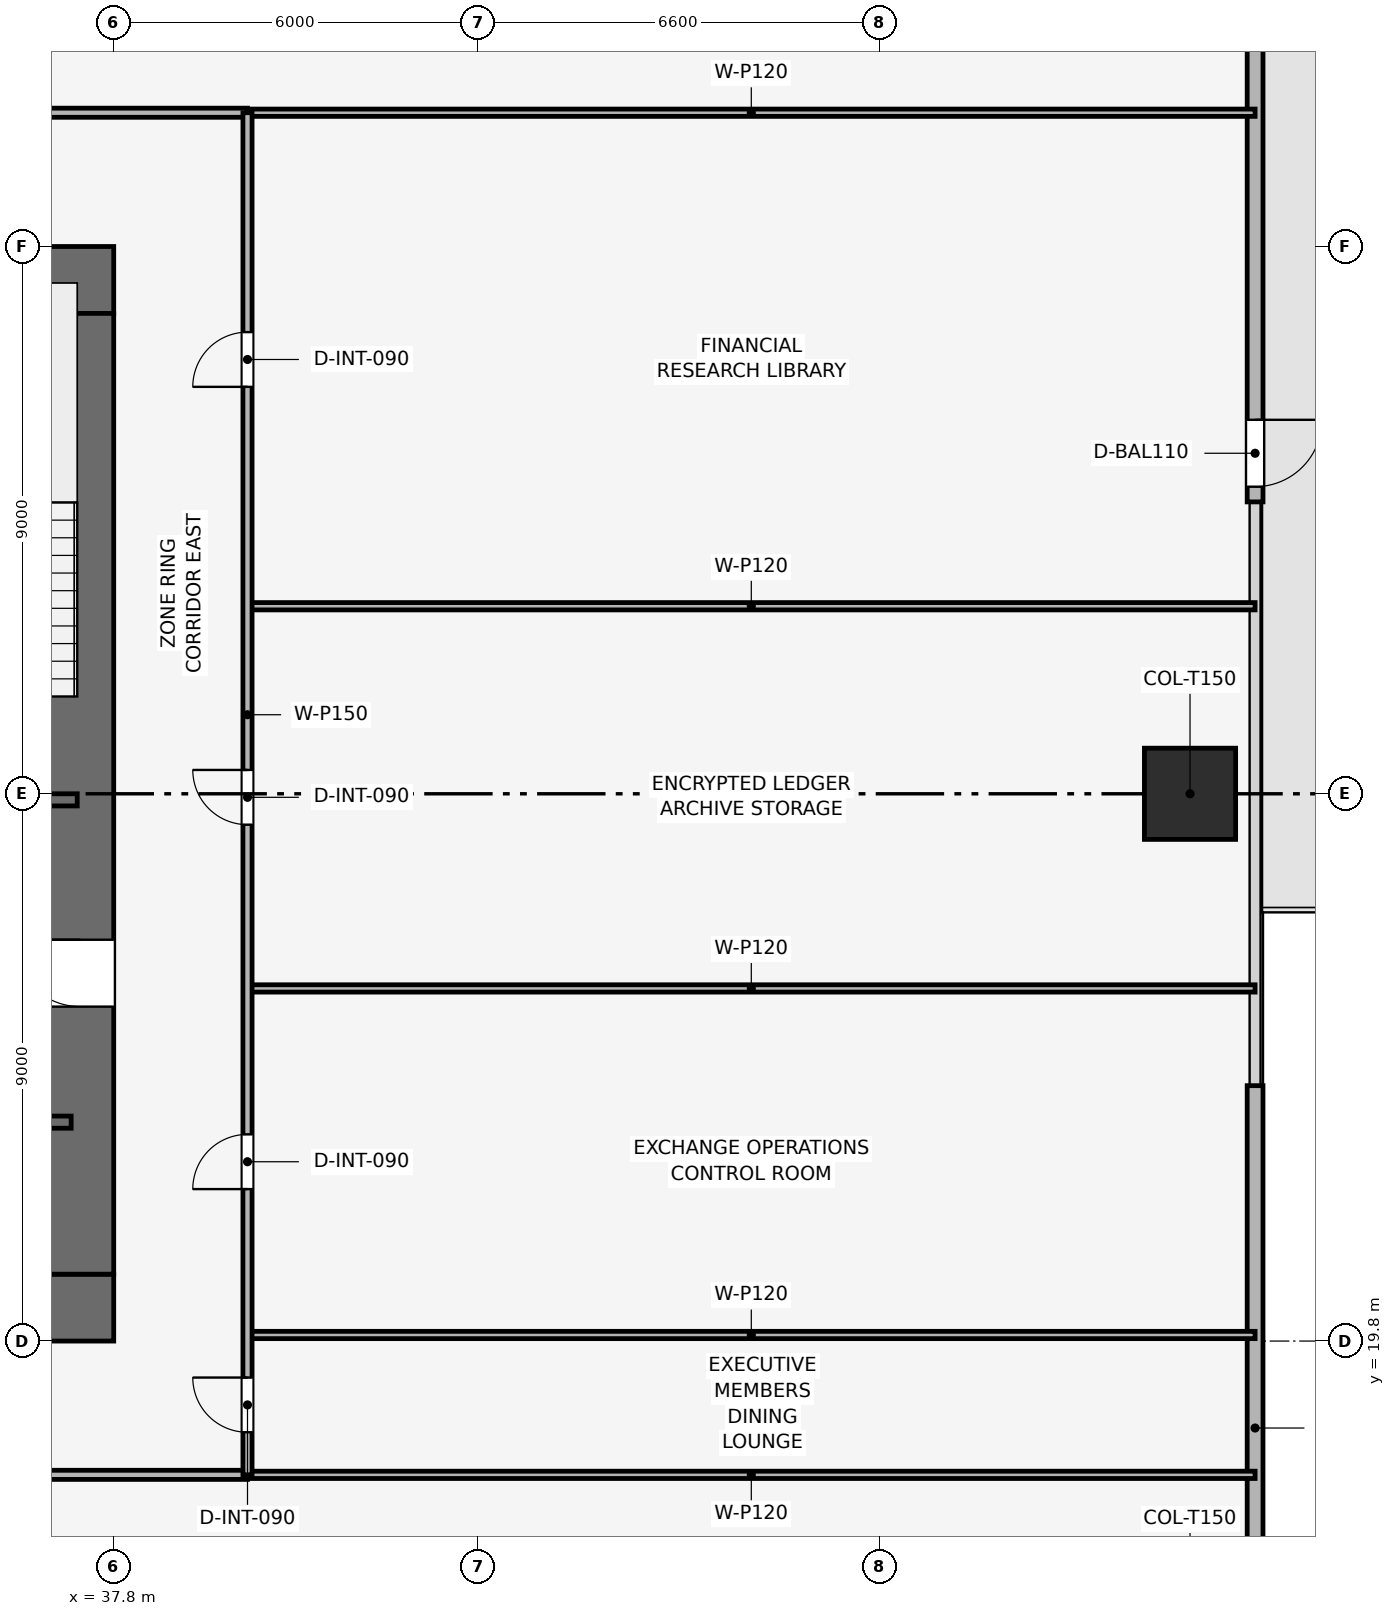
"""IFC4 building model, lengths in metres.
Left out: names, types, materials, properties, quantities, classifications, styles, units other than length and angle.
Written with IfcOpenShell. Run it as: python <this file> out.ifc"""

import sys

from ifc_helpers import new_model, si_unit, direction, frame, frame_2d, origin, origin_2d, place, context, subcontext, project, spatial, rectangle, extrude, element, fill, save


model = new_model("IFC4")
c1 = context("Model", 3, precision=1e-05, world=origin(), true_north=direction((0.0, 1.0)))
c2 = subcontext(c1, "Body", "Model", "MODEL_VIEW")
j1 = project(units=[si_unit("LENGTHUNIT", "METRE"), si_unit("PLANEANGLEUNIT", "RADIAN")], contexts=[c1])
p1 = place(None, origin())
s1 = spatial("IfcSite", under=j1, at=p1, CompositionType="ELEMENT")
p2 = place(p1, origin())
s2 = spatial("IfcBuilding", under=s1, at=p2, CompositionType="ELEMENT")
p3 = place(p2, frame((0.0, 0.0, 92.4)))
s3 = spatial("IfcBuildingStorey", under=s2, at=p3, CompositionType="ELEMENT", Elevation=92.4)
p4 = place(p3, frame((19.8, 20.35, 0.0), z_axis=(0.0, 0.0, 1.0), x_axis=(1.0, 0.0, 0.0)))
e1 = element("IfcWall", 1, at=p4, inside=s3, PredefinedType="SHEAR", context=c2, shape_type="SweptSolid", body=[
    extrude(rectangle(XDim=18.0, YDim=1.1, at=frame_2d((9.0, 0.0))), origin(), (0.0, 0.0, 1.0), 3.9),
])
p5 = place(p4, frame((8.4, 0.0, 0.0)))
e2 = element("IfcOpeningElement", 2, at=p5, cuts=e1, PredefinedType="OPENING", context=c2, shape_type="SweptSolid", body=[
    extrude(rectangle(XDim=1.2, YDim=2.2, at=frame_2d((0.6, 1.1))), frame((0.0, 0.56, 0.0), z_axis=(0.0, -1.0, 0.0), x_axis=(1.0, 0.0, 0.0)), (0.0, 0.0, 1.0), 1.12),
])
p6 = place(p3, frame((19.8, 37.25, 0.0), z_axis=(0.0, 0.0, 1.0), x_axis=(1.0, 0.0, 0.0)))
e3 = element("IfcWall", 3, at=p6, inside=s3, PredefinedType="SHEAR", context=c2, shape_type="SweptSolid", body=[
    extrude(rectangle(XDim=18.0, YDim=1.1, at=frame_2d((9.0, 0.0))), origin(), (0.0, 0.0, 1.0), 3.9),
])
p7 = place(p6, frame((7.05, 0.0, 0.0)))
e4 = element("IfcOpeningElement", 4, at=p7, cuts=e3, PredefinedType="OPENING", context=c2, shape_type="SweptSolid", body=[
    extrude(rectangle(XDim=1.1, YDim=2.15, at=frame_2d((0.55, 1.075))), frame((0.0, 0.56, 0.0), z_axis=(0.0, -1.0, 0.0), x_axis=(1.0, 0.0, 0.0)), (0.0, 0.0, 1.0), 1.12),
])
p8 = place(p3, frame((37.25, 20.9, 0.0), z_axis=(0.0, 0.0, 1.0), x_axis=(0.0, 1.0, 0.0)))
e5 = element("IfcWall", 5, at=p8, inside=s3, PredefinedType="SHEAR", context=c2, shape_type="SweptSolid", body=[
    extrude(rectangle(XDim=15.8, YDim=1.1, at=frame_2d((7.9, 0.0))), origin(), (0.0, 0.0, 1.0), 3.9),
])
p9 = place(p8, frame((4.4, 0.0, 0.0)))
e6 = element("IfcOpeningElement", 6, at=p9, cuts=e5, PredefinedType="OPENING", context=c2, shape_type="SweptSolid", body=[
    extrude(rectangle(XDim=1.1, YDim=2.15, at=frame_2d((0.55, 1.075))), frame((0.0, 0.56, 0.0), z_axis=(0.0, -1.0, 0.0), x_axis=(1.0, 0.0, 0.0)), (0.0, 0.0, 1.0), 1.12),
])
p10 = place(p3, frame((55.5, 28.8, 0.003), z_axis=(0.0, 0.0, 1.0), x_axis=(1.0, 0.0, 0.0)))
e7 = element("IfcColumn", 7, at=p10, inside=s3, PredefinedType="COLUMN", context=c2, shape_type="SweptSolid", body=[
    extrude(rectangle(XDim=1.5, YDim=1.5, at=origin_2d()), origin(), (0.0, 0.0, 1.0), 3.644),
])
p11 = place(p3, frame((56.57, 48.9, 0.0), z_axis=(0.0, 0.0, 1.0), x_axis=(0.0, -1.0, 0.0)))
e8 = element("IfcWall", 8, at=p11, inside=s3, PredefinedType="SOLIDWALL", context=c2, shape_type="SweptSolid", body=[
    extrude(rectangle(XDim=15.3, YDim=0.26, at=frame_2d((7.65, 0.0))), origin(), (0.0, 0.0, 1.0), 3.65),
])
p12 = place(p11, frame((13.95, 0.0, 0.0)))
e9 = element("IfcOpeningElement", 9, at=p12, cuts=e8, PredefinedType="OPENING", context=c2, shape_type="SweptSolid", body=[
    extrude(rectangle(XDim=1.1, YDim=2.2, at=frame_2d((0.55, 1.1))), frame((0.0, 0.14, 0.0), z_axis=(0.0, -1.0, 0.0), x_axis=(1.0, 0.0, 0.0)), (0.0, 0.0, 1.0), 0.28),
])
p13 = place(p3, frame((56.57, 24.0, 0.0), z_axis=(0.0, 0.0, 1.0), x_axis=(0.0, -1.0, 0.0)))
e10 = element("IfcWall", 10, at=p13, inside=s3, PredefinedType="SOLIDWALL", context=c2, shape_type="SweptSolid", body=[
    extrude(rectangle(XDim=15.3, YDim=0.26, at=frame_2d((7.65, 0.0))), origin(), (0.0, 0.0, 1.0), 3.65),
])
p14 = place(p13, frame((11.25, 0.0, 0.9)))
e11 = element("IfcOpeningElement", 11, at=p14, cuts=e10, PredefinedType="OPENING", context=c2, shape_type="SweptSolid", body=[
    extrude(rectangle(XDim=3.8, YDim=1.9, at=frame_2d((1.9, 0.95))), frame((0.0, 0.14, 0.0), z_axis=(0.0, -1.0, 0.0), x_axis=(1.0, 0.0, 0.0)), (0.0, 0.0, 1.0), 0.28),
])
p15 = place(p3, frame((34.05, 28.7, 0.0), z_axis=(0.0, 0.0, 1.0), x_axis=(1.0, 0.0, 0.0)))
e12 = element("IfcWall", 12, at=p15, inside=s3, PredefinedType="SHEAR", context=c2, shape_type="SweptSolid", body=[
    extrude(rectangle(XDim=3.15, YDim=0.2, at=frame_2d((1.575, 0.0))), origin(), (0.0, 0.0, 1.0), 3.65),
])
p16 = place(p15, frame((0.8, 0.0, 0.0)))
e13 = element("IfcOpeningElement", 13, at=p16, cuts=e12, PredefinedType="OPENING", context=c2, shape_type="SweptSolid", body=[
    extrude(rectangle(XDim=1.0, YDim=2.1, at=frame_2d((0.5, 1.05))), frame((0.0, 0.11, 0.0), z_axis=(0.0, -1.0, 0.0), x_axis=(1.0, 0.0, 0.0)), (0.0, 0.0, 1.0), 0.22),
])
p17 = place(p3, frame((34.05, 23.4, 0.0), z_axis=(0.0, 0.0, 1.0), x_axis=(1.0, 0.0, 0.0)))
e14 = element("IfcWall", 14, at=p17, inside=s3, PredefinedType="SHEAR", context=c2, shape_type="SweptSolid", body=[
    extrude(rectangle(XDim=3.05, YDim=0.2, at=frame_2d((1.525, 0.0))), origin(), (0.0, 0.0, 1.0), 3.65),
])
p18 = place(p17, frame((1.2, 0.0, 0.0)))
e15 = element("IfcOpeningElement", 15, at=p18, cuts=e14, PredefinedType="OPENING", context=c2, shape_type="SweptSolid", body=[
    extrude(rectangle(XDim=1.1, YDim=2.15, at=frame_2d((0.55, 1.075))), frame((0.0, 0.11, 0.0), z_axis=(0.0, -1.0, 0.0), x_axis=(1.0, 0.0, 0.0)), (0.0, 0.0, 1.0), 0.22),
])
for number, where, z_axis, x_axis in (
    (16, (40.0, 17.6, 0.0), (0.0, 0.0, 1.0), (1.0, 0.0, 0.0)),
    (17, (40.0, 40.0, 0.0), (0.0, 0.0, 1.0), (1.0, 0.0, 0.0)),
    (18, (40.0, 19.9, 0.0), (0.0, 0.0, 1.0), (1.0, 0.0, 0.0)),
    (19, (40.0, 25.599, 0.0), (0.0, 0.0, 1.0), (1.0, 0.0, 0.0)),
    (20, (40.0, 31.884, 0.0), (0.0, 0.0, 1.0), (1.0, 0.0, 0.0)),
):
    element("IfcWall", number, at=place(p3, frame(where, z_axis=z_axis, x_axis=x_axis)), inside=s3, PredefinedType="PARTITIONING", context=c2, shape_type="SweptSolid", body=[
        extrude(rectangle(XDim=16.57, YDim=0.12, at=frame_2d((8.285, 0.0))), origin(), (0.0, 0.0, 1.0), 2.935),
    ])
p19 = place(p3, frame((17.6, 17.6, 0.0), z_axis=(0.0, 0.0, 1.0), x_axis=(1.0, 0.0, 0.0)))
e21 = element("IfcWall", 21, at=p19, inside=s3, PredefinedType="PARTITIONING", context=c2, shape_type="SweptSolid", body=[
    extrude(rectangle(XDim=22.4, YDim=0.15, at=frame_2d((11.2, 0.0))), origin(), (0.0, 0.0, 1.0), 3.085),
])
p20 = place(p19, frame((1.85, 0.0, 0.0)))
e22 = element("IfcOpeningElement", 22, at=p20, cuts=e21, PredefinedType="OPENING", context=c2, shape_type="SweptSolid", body=[
    extrude(rectangle(XDim=0.9, YDim=2.1, at=frame_2d((0.45, 1.05))), frame((0.0, 0.085, 0.0), z_axis=(0.0, -1.0, 0.0), x_axis=(1.0, 0.0, 0.0)), (0.0, 0.0, 1.0), 0.17),
])
p21 = place(p19, frame((5.55, 0.0, 0.0)))
e23 = element("IfcOpeningElement", 23, at=p21, cuts=e21, PredefinedType="OPENING", context=c2, shape_type="SweptSolid", body=[
    extrude(rectangle(XDim=0.9, YDim=2.1, at=frame_2d((0.45, 1.05))), frame((0.0, 0.085, 0.0), z_axis=(0.0, -1.0, 0.0), x_axis=(1.0, 0.0, 0.0)), (0.0, 0.0, 1.0), 0.17),
])
p22 = place(p19, frame((8.45, 0.0, 0.0)))
e24 = element("IfcOpeningElement", 24, at=p22, cuts=e21, PredefinedType="OPENING", context=c2, shape_type="SweptSolid", body=[
    extrude(rectangle(XDim=0.9, YDim=2.1, at=frame_2d((0.45, 1.05))), frame((0.0, 0.085, 0.0), z_axis=(0.0, -1.0, 0.0), x_axis=(1.0, 0.0, 0.0)), (0.0, 0.0, 1.0), 0.17),
])
p23 = place(p19, frame((11.2, 0.0, 0.0)))
e25 = element("IfcOpeningElement", 25, at=p23, cuts=e21, PredefinedType="OPENING", context=c2, shape_type="SweptSolid", body=[
    extrude(rectangle(XDim=0.95, YDim=2.1, at=frame_2d((0.475, 1.05))), frame((0.0, 0.085, 0.0), z_axis=(0.0, -1.0, 0.0), x_axis=(1.0, 0.0, 0.0)), (0.0, 0.0, 1.0), 0.17),
])
p24 = place(p19, frame((17.25, 0.0, 0.0)))
e26 = element("IfcOpeningElement", 26, at=p24, cuts=e21, PredefinedType="OPENING", context=c2, shape_type="SweptSolid", body=[
    extrude(rectangle(XDim=0.9, YDim=2.1, at=frame_2d((0.45, 1.05))), frame((0.0, 0.085, 0.0), z_axis=(0.0, -1.0, 0.0), x_axis=(1.0, 0.0, 0.0)), (0.0, 0.0, 1.0), 0.17),
])
p25 = place(p3, frame((17.6, 40.0, 0.0), z_axis=(0.0, 0.0, 1.0), x_axis=(1.0, 0.0, 0.0)))
e27 = element("IfcWall", 27, at=p25, inside=s3, PredefinedType="PARTITIONING", context=c2, shape_type="SweptSolid", body=[
    extrude(rectangle(XDim=22.4, YDim=0.15, at=frame_2d((11.2, 0.0))), origin(), (0.0, 0.0, 1.0), 3.085),
])
p26 = place(p25, frame((10.75, 0.0, 0.0)))
e28 = element("IfcOpeningElement", 28, at=p26, cuts=e27, PredefinedType="OPENING", context=c2, shape_type="SweptSolid", body=[
    extrude(rectangle(XDim=0.9, YDim=2.1, at=frame_2d((0.45, 1.05))), frame((0.0, 0.085, 0.0), z_axis=(0.0, -1.0, 0.0), x_axis=(1.0, 0.0, 0.0)), (0.0, 0.0, 1.0), 0.17),
])
p27 = place(p3, frame((40.0, 17.6, 0.0), z_axis=(0.0, 0.0, 1.0), x_axis=(0.0, 1.0, 0.0)))
e29 = element("IfcWall", 29, at=p27, inside=s3, PredefinedType="PARTITIONING", context=c2, shape_type="SweptSolid", body=[
    extrude(rectangle(XDim=22.4, YDim=0.15, at=frame_2d((11.2, 0.0))), origin(), (0.0, 0.0, 1.0), 3.085),
])
p28 = place(p27, frame((0.7, 0.0, 0.0)))
e30 = element("IfcOpeningElement", 30, at=p28, cuts=e29, PredefinedType="OPENING", context=c2, shape_type="SweptSolid", body=[
    extrude(rectangle(XDim=0.9, YDim=2.1, at=frame_2d((0.45, 1.05))), frame((0.0, 0.085, 0.0), z_axis=(0.0, -1.0, 0.0), x_axis=(1.0, 0.0, 0.0)), (0.0, 0.0, 1.0), 0.17),
])
p29 = place(p27, frame((4.699, 0.0, 0.0)))
e31 = element("IfcOpeningElement", 31, at=p29, cuts=e29, PredefinedType="OPENING", context=c2, shape_type="SweptSolid", body=[
    extrude(rectangle(XDim=0.9, YDim=2.1, at=frame_2d((0.45, 1.05))), frame((0.0, 0.085, 0.0), z_axis=(0.0, -1.0, 0.0), x_axis=(1.0, 0.0, 0.0)), (0.0, 0.0, 1.0), 0.17),
])
p30 = place(p27, frame((10.692, 0.0, 0.0)))
e32 = element("IfcOpeningElement", 32, at=p30, cuts=e29, PredefinedType="OPENING", context=c2, shape_type="SweptSolid", body=[
    extrude(rectangle(XDim=0.9, YDim=2.1, at=frame_2d((0.45, 1.05))), frame((0.0, 0.085, 0.0), z_axis=(0.0, -1.0, 0.0), x_axis=(1.0, 0.0, 0.0)), (0.0, 0.0, 1.0), 0.17),
])
p31 = place(p27, frame((17.892, 0.0, 0.0)))
e33 = element("IfcOpeningElement", 33, at=p31, cuts=e29, PredefinedType="OPENING", context=c2, shape_type="SweptSolid", body=[
    extrude(rectangle(XDim=0.9, YDim=2.1, at=frame_2d((0.45, 1.05))), frame((0.0, 0.085, 0.0), z_axis=(0.0, -1.0, 0.0), x_axis=(1.0, 0.0, 0.0)), (0.0, 0.0, 1.0), 0.17),
])
p32 = place(p12, origin())
e34 = element("IfcDoor", 34, at=p32, inside=s3, OperationType="SINGLE_SWING_LEFT", PredefinedType="DOOR", context=c2, shape_type="SweptSolid", body=[
    extrude(rectangle(XDim=1.1, YDim=2.2, at=frame_2d((0.55, 1.1))), frame((0.0, 0.025, 0.0), z_axis=(0.0, -1.0, 0.0), x_axis=(1.0, 0.0, 0.0)), (0.0, 0.0, 1.0), 0.05),
])
fill(e9, e34)
p33 = place(p28, origin())
e35 = element("IfcDoor", 35, at=p33, inside=s3, OperationType="SINGLE_SWING_RIGHT", PredefinedType="DOOR", context=c2, shape_type="SweptSolid", body=[
    extrude(rectangle(XDim=0.9, YDim=2.1, at=frame_2d((0.45, 1.05))), frame((0.0, 0.025, 0.0), z_axis=(0.0, -1.0, 0.0), x_axis=(1.0, 0.0, 0.0)), (0.0, 0.0, 1.0), 0.05),
])
fill(e30, e35)
p34 = place(p29, origin())
e36 = element("IfcDoor", 36, at=p34, inside=s3, OperationType="SINGLE_SWING_LEFT", PredefinedType="DOOR", context=c2, shape_type="SweptSolid", body=[
    extrude(rectangle(XDim=0.9, YDim=2.1, at=frame_2d((0.45, 1.05))), frame((0.0, 0.025, 0.0), z_axis=(0.0, -1.0, 0.0), x_axis=(1.0, 0.0, 0.0)), (0.0, 0.0, 1.0), 0.05),
])
fill(e31, e36)
p35 = place(p30, origin())
e37 = element("IfcDoor", 37, at=p35, inside=s3, OperationType="SINGLE_SWING_RIGHT", PredefinedType="DOOR", context=c2, shape_type="SweptSolid", body=[
    extrude(rectangle(XDim=0.9, YDim=2.1, at=frame_2d((0.45, 1.05))), frame((0.0, 0.025, 0.0), z_axis=(0.0, -1.0, 0.0), x_axis=(1.0, 0.0, 0.0)), (0.0, 0.0, 1.0), 0.05),
])
fill(e32, e37)
p36 = place(p31, origin())
e38 = element("IfcDoor", 38, at=p36, inside=s3, OperationType="SINGLE_SWING_LEFT", PredefinedType="DOOR", context=c2, shape_type="SweptSolid", body=[
    extrude(rectangle(XDim=0.9, YDim=2.1, at=frame_2d((0.45, 1.05))), frame((0.0, 0.025, 0.0), z_axis=(0.0, -1.0, 0.0), x_axis=(1.0, 0.0, 0.0)), (0.0, 0.0, 1.0), 0.05),
])
fill(e33, e38)
p37 = place(p9, origin())
e39 = element("IfcDoor", 39, at=p37, inside=s3, OperationType="SINGLE_SWING_RIGHT", PredefinedType="DOOR", context=c2, shape_type="SweptSolid", body=[
    extrude(rectangle(XDim=1.1, YDim=2.15, at=frame_2d((0.55, 1.075))), frame((0.0, 0.025, 0.0), z_axis=(0.0, -1.0, 0.0), x_axis=(1.0, 0.0, 0.0)), (0.0, 0.0, 1.0), 0.05),
])
fill(e6, e39)
save(model, sys.argv[1])
